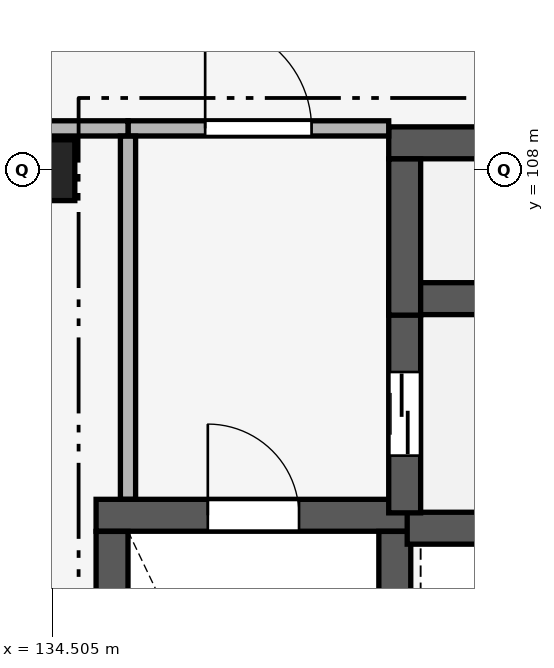
"""IFC4 building model, lengths in metres.
Left out: names, types, materials, properties, quantities, classifications, styles, units other than length and angle.
Written with IfcOpenShell. Run it as: python <this file> out.ifc"""

import sys

from ifc_helpers import new_model, si_unit, direction, frame, frame_2d, origin, origin_2d, place, context, subcontext, project, spatial, rectangle, extrude, element, fill, save


model = new_model("IFC4")
c1 = context("Model", 3, precision=1e-05, world=origin(), true_north=direction((0.0, 1.0)))
c2 = subcontext(c1, "Body", "Model", "MODEL_VIEW")
j1 = project(units=[si_unit("LENGTHUNIT", "METRE"), si_unit("PLANEANGLEUNIT", "RADIAN")], contexts=[c1])
p1 = place(None, origin())
s1 = spatial("IfcSite", under=j1, at=p1, CompositionType="ELEMENT")
p2 = place(p1, origin())
s2 = spatial("IfcBuilding", under=s1, at=p2, CompositionType="ELEMENT")
p3 = place(p2, frame((0.0, 0.0, 15.3)))
s3 = spatial("IfcBuildingStorey", under=s2, at=p3, CompositionType="ELEMENT", Elevation=15.3)
p4 = place(p3, frame((134.4, 108.0, 0.0), z_axis=(0.0, 0.0, 1.0), x_axis=(1.0, 0.0, 0.0)))
e1 = element("IfcColumn", 1, at=p4, inside=s3, PredefinedType="COLUMN", context=c2, shape_type="SweptSolid", body=[
    extrude(rectangle(XDim=0.8, YDim=0.8, at=origin_2d()), origin(), (0.0, 0.0, 1.0), 5.1),
])
p5 = place(p3, frame((135.08, 103.46, 0.0), z_axis=(0.0, 0.0, 1.0), x_axis=(1.0, 0.0, 0.0)))
e2 = element("IfcWall", 2, at=p5, inside=s3, PredefinedType="SHEAR", context=c2, shape_type="SweptSolid", body=[
    extrude(rectangle(XDim=4.14, YDim=0.42, at=frame_2d((2.07, 0.0))), origin(), (0.0, 0.0, 1.0), 4.84),
])
p6 = place(p5, frame((1.47, 0.0, 0.0)))
e3 = element("IfcOpeningElement", 3, at=p6, cuts=e2, PredefinedType="OPENING", context=c2, shape_type="SweptSolid", body=[
    extrude(rectangle(XDim=1.2, YDim=2.2, at=frame_2d((0.6, 1.1))), frame((0.0, 0.225, 0.0), z_axis=(0.0, -1.0, 0.0), x_axis=(1.0, 0.0, 0.0)), (0.0, 0.0, 1.0), 0.45),
])
for number, where, z_axis, x_axis in (
    (4, (135.29, 96.352, 0.0), (0.0, 0.0, 1.0), (0.0, 1.0, 0.0)),
    (5, (139.01, 96.352, 0.0), (0.0, 0.0, 1.0), (0.0, 1.0, 0.0)),
):
    element("IfcWall", number, at=place(p3, frame(where, z_axis=z_axis, x_axis=x_axis)), inside=s3, PredefinedType="SHEAR", context=c2, shape_type="SweptSolid", body=[
        extrude(rectangle(XDim=6.896, YDim=0.42, at=frame_2d((3.448, 0.0))), origin(), (0.0, 0.0, 1.0), 4.84),
    ])
p7 = place(p3, frame((139.173, 103.29, 0.0), z_axis=(0.0, 0.0, 1.0), x_axis=(1.0, 0.0, 0.0)))
e6 = element("IfcWall", 6, at=p7, inside=s3, PredefinedType="SHEAR", context=c2, shape_type="SweptSolid", body=[
    extrude(rectangle(XDim=2.997, YDim=0.42, at=frame_2d((1.499, 0.0))), origin(), (0.0, 0.0, 1.0), 4.84),
])
p8 = place(p3, frame((138.93, 106.31, 0.0), z_axis=(0.0, 0.0, 1.0), x_axis=(1.0, 0.0, 0.0)))
e7 = element("IfcWall", 7, at=p8, inside=s3, PredefinedType="SHEAR", context=c2, shape_type="SweptSolid", body=[
    extrude(rectangle(XDim=3.24, YDim=0.42, at=frame_2d((1.62, 0.0))), origin(), (0.0, 0.0, 1.0), 4.84),
])
p9 = place(p3, frame((139.14, 103.492, 0.0), z_axis=(0.0, 0.0, 1.0), x_axis=(0.0, 1.0, 0.0)))
e8 = element("IfcWall", 8, at=p9, inside=s3, PredefinedType="SHEAR", context=c2, shape_type="SweptSolid", body=[
    extrude(rectangle(XDim=2.606, YDim=0.42, at=frame_2d((1.303, 0.0))), origin(), (0.0, 0.0, 1.0), 4.84),
])
p10 = place(p9, frame((0.753, 0.0, 0.0)))
e9 = element("IfcOpeningElement", 9, at=p10, cuts=e8, PredefinedType="OPENING", context=c2, shape_type="SweptSolid", body=[
    extrude(rectangle(XDim=1.1, YDim=2.15, at=frame_2d((0.55, 1.075))), frame((0.0, 0.225, 0.0), z_axis=(0.0, -1.0, 0.0), x_axis=(1.0, 0.0, 0.0)), (0.0, 0.0, 1.0), 0.45),
])
p11 = place(p3, frame((138.93, 108.36, 0.0), z_axis=(0.0, 0.0, 1.0), x_axis=(1.0, 0.0, 0.0)))
e10 = element("IfcWall", 10, at=p11, inside=s3, PredefinedType="SHEAR", context=c2, shape_type="SweptSolid", body=[
    extrude(rectangle(XDim=3.475, YDim=0.42, at=frame_2d((1.738, 0.0))), origin(), (0.0, 0.0, 1.0), 4.84),
])
p12 = place(p11, frame((1.187, 0.0, 0.0)))
e11 = element("IfcOpeningElement", 11, at=p12, cuts=e10, PredefinedType="OPENING", context=c2, shape_type="SweptSolid", body=[
    extrude(rectangle(XDim=1.1, YDim=2.15, at=frame_2d((0.55, 1.075))), frame((0.0, 0.225, 0.0), z_axis=(0.0, -1.0, 0.0), x_axis=(1.0, 0.0, 0.0)), (0.0, 0.0, 1.0), 0.45),
])
p13 = place(p3, frame((139.14, 106.093, 0.0), z_axis=(0.0, 0.0, 1.0), x_axis=(0.0, 1.0, 0.0)))
e12 = element("IfcWall", 12, at=p13, inside=s3, PredefinedType="SHEAR", context=c2, shape_type="SweptSolid", body=[
    extrude(rectangle(XDim=2.055, YDim=0.42, at=frame_2d((1.027, 0.0))), origin(), (0.0, 0.0, 1.0), 4.84),
])
p14 = place(p3, frame((135.5, 108.55, 0.0), z_axis=(0.0, 0.0, 1.0), x_axis=(1.0, 0.0, 0.0)))
e13 = element("IfcWall", 13, at=p14, inside=s3, PredefinedType="PARTITIONING", context=c2, shape_type="SweptSolid", body=[
    extrude(rectangle(XDim=3.43, YDim=0.2, at=frame_2d((1.715, 0.0))), origin(), (0.0, 0.0, 1.0), 4.84),
])
p15 = place(p14, frame((1.015, 0.0, 0.0)))
e14 = element("IfcOpeningElement", 14, at=p15, cuts=e13, PredefinedType="OPENING", context=c2, shape_type="SweptSolid", body=[
    extrude(rectangle(XDim=1.4, YDim=2.2, at=frame_2d((0.7, 1.1))), frame((0.0, 0.115, 0.0), z_axis=(0.0, -1.0, 0.0), x_axis=(1.0, 0.0, 0.0)), (0.0, 0.0, 1.0), 0.23),
])
p16 = place(p3, frame((134.3, 108.55, 0.0), z_axis=(0.0, 0.0, 1.0), x_axis=(1.0, 0.0, 0.0)))
e15 = element("IfcWall", 15, at=p16, inside=s3, PredefinedType="PARTITIONING", context=c2, shape_type="SweptSolid", body=[
    extrude(rectangle(XDim=1.2, YDim=0.2, at=frame_2d((0.6, 0.0))), origin(), (0.0, 0.0, 1.0), 4.29),
])
p17 = place(p3, frame((135.5, 103.672, 0.0), z_axis=(0.0, 0.0, 1.0), x_axis=(0.0, 1.0, 0.0)))
e16 = element("IfcWall", 16, at=p17, inside=s3, PredefinedType="PARTITIONING", context=c2, shape_type="SweptSolid", body=[
    extrude(rectangle(XDim=4.776, YDim=0.2, at=frame_2d((2.388, 0.0))), origin(), (0.0, 0.0, 1.0), 4.84),
])
p18 = place(p6, origin())
e17 = element("IfcDoor", 17, at=p18, inside=s3, OperationType="SINGLE_SWING_LEFT", PredefinedType="DOOR", context=c2, shape_type="SweptSolid", body=[
    extrude(rectangle(XDim=1.2, YDim=2.2, at=frame_2d((0.6, 1.1))), frame((0.0, 0.025, 0.0), z_axis=(0.0, -1.0, 0.0), x_axis=(1.0, 0.0, 0.0)), (0.0, 0.0, 1.0), 0.05),
])
fill(e3, e17)
p19 = place(p10, origin())
e18 = element("IfcDoor", 18, at=p19, inside=s3, OperationType="DOUBLE_DOOR_SLIDING", PredefinedType="DOOR", context=c2, shape_type="SweptSolid", body=[
    extrude(rectangle(XDim=1.1, YDim=2.15, at=frame_2d((0.55, 1.075))), frame((0.0, 0.025, 0.0), z_axis=(0.0, -1.0, 0.0), x_axis=(1.0, 0.0, 0.0)), (0.0, 0.0, 1.0), 0.05),
])
fill(e9, e18)
p20 = place(p15, origin())
e19 = element("IfcDoor", 19, at=p20, inside=s3, OperationType="SINGLE_SWING_LEFT", PredefinedType="DOOR", context=c2, shape_type="SweptSolid", body=[
    extrude(rectangle(XDim=1.4, YDim=2.2, at=frame_2d((0.7, 1.1))), frame((0.0, 0.025, 0.0), z_axis=(0.0, -1.0, 0.0), x_axis=(1.0, 0.0, 0.0)), (0.0, 0.0, 1.0), 0.05),
])
fill(e14, e19)
save(model, sys.argv[1])
